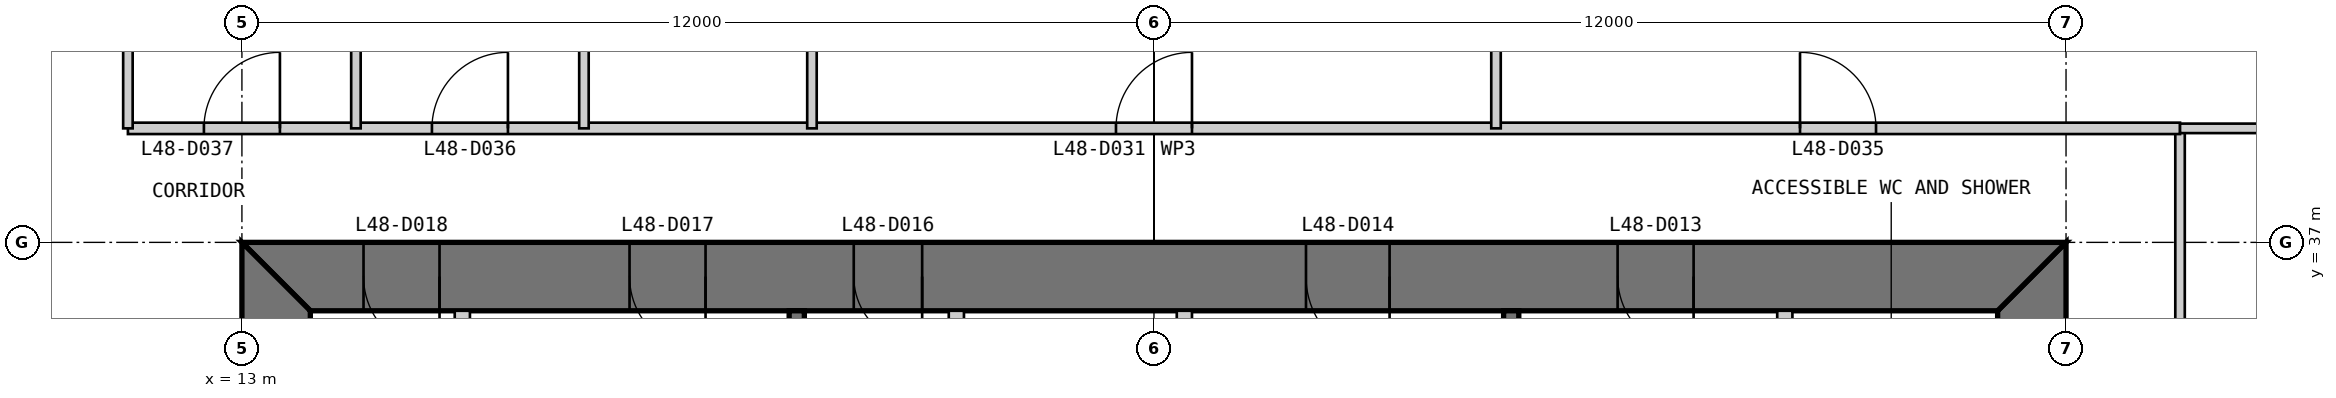
"""IFC4 building model, lengths in metres.
Left out: names, types, materials, properties, quantities, classifications, styles, units other than length and angle.
Written with IfcOpenShell. Run it as: python <this file> out.ifc"""

import sys

from ifc_helpers import new_model, si_unit, direction, frame, frame_2d, origin, place, context, subcontext, project, spatial, polyline, rectangle, outline, extrude, element, fill, save


model = new_model("IFC4")
c1 = context("Model", 3, precision=1e-05, world=origin(), true_north=direction((0.0, 1.0)))
c2 = subcontext(c1, "Body", "Model", "MODEL_VIEW")
j1 = project(units=[si_unit("LENGTHUNIT", "METRE"), si_unit("PLANEANGLEUNIT", "RADIAN")], contexts=[c1])
p1 = place(None, origin())
s1 = spatial("IfcSite", under=j1, at=p1, CompositionType="ELEMENT")
p2 = place(p1, origin())
s2 = spatial("IfcBuilding", under=s1, at=p2, CompositionType="ELEMENT")
p3 = place(p2, frame((0.0, 0.0, 205.8)))
s3 = spatial("IfcBuildingStorey", under=s2, at=p3, CompositionType="ELEMENT", Elevation=205.8)
p4 = place(p3, frame((36.55, 13.9, 0.0), z_axis=(0.0, 0.0, 1.0), x_axis=(0.0, 1.0, 0.0)))
e1 = element("IfcWall", 1, at=p4, inside=s3, PredefinedType="SHEAR", context=c2, shape_type="SweptSolid", body=[
    extrude(outline(polyline([(-0.9, -0.45), (23.1, -0.45), (22.2, 0.45), (0.0, 0.45), (-0.9, -0.45)])), origin(), (0.0, 0.0, 1.0), 4.0),
])
p5 = place(p4, frame((20.2, 0.0, 0.0)))
e2 = element("IfcOpeningElement", 2, at=p5, cuts=e1, PredefinedType="OPENING", context=c2, shape_type="SweptSolid", body=[
    extrude(rectangle(XDim=1.0, YDim=2.2, at=frame_2d((0.5, 1.1))), frame((0.0, 0.46, 0.0), z_axis=(0.0, -1.0, 0.0), x_axis=(1.0, 0.0, 0.0)), (0.0, 0.0, 1.0), 0.92),
])
p6 = place(p4, frame((17.25, 0.0, 0.0)))
e3 = element("IfcOpeningElement", 3, at=p6, cuts=e1, PredefinedType="OPENING", context=c2, shape_type="SweptSolid", body=[
    extrude(rectangle(XDim=0.9, YDim=2.2, at=frame_2d((0.45, 1.1))), frame((0.0, 0.46, 0.0), z_axis=(0.0, -1.0, 0.0), x_axis=(1.0, 0.0, 0.0)), (0.0, 0.0, 1.0), 0.92),
])
p7 = place(p3, frame((37.0, 36.55, 0.0), z_axis=(0.0, 0.0, 1.0), x_axis=(-1.0, 0.0, 0.0)))
e4 = element("IfcWall", 4, at=p7, inside=s3, PredefinedType="SHEAR", context=c2, shape_type="SweptSolid", body=[
    extrude(outline(polyline([(0.0, -0.45), (24.0, -0.45), (23.1, 0.45), (0.9, 0.45), (0.0, -0.45)])), origin(), (0.0, 0.0, 1.0), 4.0),
])
p8 = place(p7, frame((4.9, 0.0, 0.0)))
e5 = element("IfcOpeningElement", 5, at=p8, cuts=e4, PredefinedType="OPENING", context=c2, shape_type="SweptSolid", body=[
    extrude(rectangle(XDim=1.0, YDim=2.2, at=frame_2d((0.5, 1.1))), frame((0.0, 0.46, 0.0), z_axis=(0.0, -1.0, 0.0), x_axis=(1.0, 0.0, 0.0)), (0.0, 0.0, 1.0), 0.92),
])
p9 = place(p7, frame((8.9, 0.0, 0.0)))
e6 = element("IfcOpeningElement", 6, at=p9, cuts=e4, PredefinedType="OPENING", context=c2, shape_type="SweptSolid", body=[
    extrude(rectangle(XDim=1.1, YDim=2.2, at=frame_2d((0.55, 1.1))), frame((0.0, 0.46, 0.0), z_axis=(0.0, -1.0, 0.0), x_axis=(1.0, 0.0, 0.0)), (0.0, 0.0, 1.0), 0.92),
])
p10 = place(p7, frame((15.05, 0.0, 0.0)))
e7 = element("IfcOpeningElement", 7, at=p10, cuts=e4, PredefinedType="OPENING", context=c2, shape_type="SweptSolid", body=[
    extrude(rectangle(XDim=0.9, YDim=2.2, at=frame_2d((0.45, 1.1))), frame((0.0, 0.46, 0.0), z_axis=(0.0, -1.0, 0.0), x_axis=(1.0, 0.0, 0.0)), (0.0, 0.0, 1.0), 0.92),
])
p11 = place(p7, frame((17.9, 0.0, 0.0)))
e8 = element("IfcOpeningElement", 8, at=p11, cuts=e4, PredefinedType="OPENING", context=c2, shape_type="SweptSolid", body=[
    extrude(rectangle(XDim=1.0, YDim=2.2, at=frame_2d((0.5, 1.1))), frame((0.0, 0.46, 0.0), z_axis=(0.0, -1.0, 0.0), x_axis=(1.0, 0.0, 0.0)), (0.0, 0.0, 1.0), 0.92),
])
p12 = place(p7, frame((21.4, 0.0, 0.0)))
e9 = element("IfcOpeningElement", 9, at=p12, cuts=e4, PredefinedType="OPENING", context=c2, shape_type="SweptSolid", body=[
    extrude(rectangle(XDim=1.0, YDim=2.2, at=frame_2d((0.5, 1.1))), frame((0.0, 0.46, 0.0), z_axis=(0.0, -1.0, 0.0), x_axis=(1.0, 0.0, 0.0)), (0.0, 0.0, 1.0), 0.92),
])
p13 = place(p3, frame((13.45, 36.1, 0.0), z_axis=(0.0, 0.0, 1.0), x_axis=(0.0, -1.0, 0.0)))
e10 = element("IfcWall", 10, at=p13, inside=s3, PredefinedType="SHEAR", context=c2, shape_type="SweptSolid", body=[
    extrude(outline(polyline([(-0.9, -0.45), (23.1, -0.45), (22.2, 0.45), (0.0, 0.45), (-0.9, -0.45)])), origin(), (0.0, 0.0, 1.0), 4.0),
])
p14 = place(p13, frame((20.2, 0.0, 0.0)))
e11 = element("IfcOpeningElement", 11, at=p14, cuts=e10, PredefinedType="OPENING", context=c2, shape_type="SweptSolid", body=[
    extrude(rectangle(XDim=1.0, YDim=2.2, at=frame_2d((0.5, 1.1))), frame((0.0, 0.46, 0.0), z_axis=(0.0, -1.0, 0.0), x_axis=(1.0, 0.0, 0.0)), (0.0, 0.0, 1.0), 0.92),
])
p15 = place(p13, frame((17.25, 0.0, 0.0)))
e12 = element("IfcOpeningElement", 12, at=p15, cuts=e10, PredefinedType="OPENING", context=c2, shape_type="SweptSolid", body=[
    extrude(rectangle(XDim=0.9, YDim=2.2, at=frame_2d((0.45, 1.1))), frame((0.0, 0.46, 0.0), z_axis=(0.0, -1.0, 0.0), x_axis=(1.0, 0.0, 0.0)), (0.0, 0.0, 1.0), 0.92),
])
p16 = place(p3, frame((33.3, 36.1, 0.0), z_axis=(0.0, 0.0, 1.0), x_axis=(0.0, -1.0, 0.0)))
e13 = element("IfcWall", 13, at=p16, inside=s3, PredefinedType="PARTITIONING", context=c2, shape_type="SweptSolid", body=[
    extrude(rectangle(XDim=16.1, YDim=0.2, at=frame_2d((8.05, 0.0))), origin(), (0.0, 0.0, 1.0), 3.8),
])
p17 = place(p16, frame((4.4, 0.0, 0.0)))
e14 = element("IfcOpeningElement", 14, at=p17, cuts=e13, PredefinedType="OPENING", context=c2, shape_type="SweptSolid", body=[
    extrude(rectangle(XDim=0.9, YDim=2.2, at=frame_2d((0.45, 1.1))), frame((0.0, 0.11, 0.0), z_axis=(0.0, -1.0, 0.0), x_axis=(1.0, 0.0, 0.0)), (0.0, 0.0, 1.0), 0.22),
])
p18 = place(p3, frame((29.7, 36.1, 0.0), z_axis=(0.0, 0.0, 1.0), x_axis=(0.0, -1.0, 0.0)))
e15 = element("IfcWall", 15, at=p18, inside=s3, PredefinedType="SOLIDWALL", context=c2, shape_type="SweptSolid", body=[
    extrude(rectangle(XDim=16.1, YDim=0.2, at=frame_2d((8.05, 0.0))), origin(), (0.0, 0.0, 1.0), 3.8),
])
p19 = place(p18, frame((7.217, 0.0, 0.0)))
e16 = element("IfcOpeningElement", 16, at=p19, cuts=e15, PredefinedType="OPENING", context=c2, shape_type="SweptSolid", body=[
    extrude(rectangle(XDim=1.1, YDim=2.2, at=frame_2d((0.55, 1.1))), frame((0.0, 0.11, 0.0), z_axis=(0.0, -1.0, 0.0), x_axis=(1.0, 0.0, 0.0)), (0.0, 0.0, 1.0), 0.22),
])
p20 = place(p18, frame((10.55, 0.0, 0.0)))
e17 = element("IfcOpeningElement", 17, at=p20, cuts=e15, PredefinedType="OPENING", context=c2, shape_type="SweptSolid", body=[
    extrude(rectangle(XDim=1.1, YDim=2.2, at=frame_2d((0.55, 1.1))), frame((0.0, 0.11, 0.0), z_axis=(0.0, -1.0, 0.0), x_axis=(1.0, 0.0, 0.0)), (0.0, 0.0, 1.0), 0.22),
])
p21 = place(p18, frame((13.883, 0.0, 0.0)))
e18 = element("IfcOpeningElement", 18, at=p21, cuts=e15, PredefinedType="OPENING", context=c2, shape_type="SweptSolid", body=[
    extrude(rectangle(XDim=1.1, YDim=2.2, at=frame_2d((0.55, 1.1))), frame((0.0, 0.11, 0.0), z_axis=(0.0, -1.0, 0.0), x_axis=(1.0, 0.0, 0.0)), (0.0, 0.0, 1.0), 0.22),
])
p22 = place(p3, frame((25.4, 36.1, 0.0), z_axis=(0.0, 0.0, 1.0), x_axis=(0.0, -1.0, 0.0)))
e19 = element("IfcWall", 19, at=p22, inside=s3, PredefinedType="PARTITIONING", context=c2, shape_type="SweptSolid", body=[
    extrude(rectangle(XDim=3.3, YDim=0.2, at=frame_2d((1.65, 0.0))), origin(), (0.0, 0.0, 1.0), 3.8),
])
p23 = place(p22, frame((0.9, 0.0, 0.0)))
e20 = element("IfcOpeningElement", 20, at=p23, cuts=e19, PredefinedType="OPENING", context=c2, shape_type="SweptSolid", body=[
    extrude(rectangle(XDim=1.1, YDim=2.2, at=frame_2d((0.55, 1.1))), frame((0.0, 0.11, 0.0), z_axis=(0.0, -1.0, 0.0), x_axis=(1.0, 0.0, 0.0)), (0.0, 0.0, 1.0), 0.22),
])
p24 = place(p3, frame((22.4, 36.1, 0.0), z_axis=(0.0, 0.0, 1.0), x_axis=(0.0, -1.0, 0.0)))
e21 = element("IfcWall", 21, at=p24, inside=s3, PredefinedType="PARTITIONING", context=c2, shape_type="SweptSolid", body=[
    extrude(rectangle(XDim=3.3, YDim=0.2, at=frame_2d((1.65, 0.0))), origin(), (0.0, 0.0, 1.0), 3.8),
])
p25 = place(p3, frame((20.3, 36.1, 0.0), z_axis=(0.0, 0.0, 1.0), x_axis=(0.0, -1.0, 0.0)))
e22 = element("IfcWall", 22, at=p25, inside=s3, PredefinedType="SOLIDWALL", context=c2, shape_type="SweptSolid", body=[
    extrude(rectangle(XDim=6.1, YDim=0.2, at=frame_2d((3.05, 0.0))), origin(), (0.0, 0.0, 1.0), 3.8),
])
p26 = place(p3, frame((15.9, 36.1, 0.0), z_axis=(0.0, 0.0, 1.0), x_axis=(0.0, -1.0, 0.0)))
e23 = element("IfcWall", 23, at=p26, inside=s3, PredefinedType="PARTITIONING", context=c2, shape_type="SweptSolid", body=[
    extrude(rectangle(XDim=6.1, YDim=0.2, at=frame_2d((3.05, 0.0))), origin(), (0.0, 0.0, 1.0), 3.8),
])
p27 = place(p3, frame((38.5, 35.5, 0.0), z_axis=(0.0, 0.0, 1.0), x_axis=(0.0, 1.0, 0.0)))
e24 = element("IfcWall", 24, at=p27, inside=s3, PredefinedType="PARTITIONING", context=c2, shape_type="SweptSolid", body=[
    extrude(rectangle(XDim=3.0, YDim=0.125, at=frame_2d((1.5, 0.0))), origin(), (0.0, 0.0, 1.0), 3.85),
])
p28 = place(p3, frame((38.5, 38.5, 0.0), z_axis=(0.0, 0.0, 1.0), x_axis=(-1.0, 0.0, 0.0)))
e25 = element("IfcWall", 25, at=p28, inside=s3, PredefinedType="PARTITIONING", context=c2, shape_type="SweptSolid", body=[
    extrude(rectangle(XDim=27.0, YDim=0.15, at=frame_2d((13.5, 0.0))), origin(), (0.0, 0.0, 1.0), 3.85),
])
p29 = place(p28, frame((13.0, 0.0, 0.0)))
e26 = element("IfcOpeningElement", 26, at=p29, cuts=e25, PredefinedType="OPENING", context=c2, shape_type="SweptSolid", body=[
    extrude(rectangle(XDim=1.0, YDim=2.2, at=frame_2d((0.5, 1.1))), frame((0.0, 0.085, 0.0), z_axis=(0.0, -1.0, 0.0), x_axis=(1.0, 0.0, 0.0)), (0.0, 0.0, 1.0), 0.17),
])
p30 = place(p28, frame((4.0, 0.0, 0.0)))
e27 = element("IfcOpeningElement", 27, at=p30, cuts=e25, PredefinedType="OPENING", context=c2, shape_type="SweptSolid", body=[
    extrude(rectangle(XDim=1.0, YDim=2.2, at=frame_2d((0.5, 1.1))), frame((0.0, 0.085, 0.0), z_axis=(0.0, -1.0, 0.0), x_axis=(1.0, 0.0, 0.0)), (0.0, 0.0, 1.0), 0.17),
])
p31 = place(p28, frame((22.0, 0.0, 0.0)))
e28 = element("IfcOpeningElement", 28, at=p31, cuts=e25, PredefinedType="OPENING", context=c2, shape_type="SweptSolid", body=[
    extrude(rectangle(XDim=1.0, YDim=2.2, at=frame_2d((0.5, 1.1))), frame((0.0, 0.085, 0.0), z_axis=(0.0, -1.0, 0.0), x_axis=(1.0, 0.0, 0.0)), (0.0, 0.0, 1.0), 0.17),
])
p32 = place(p28, frame((25.0, 0.0, 0.0)))
e29 = element("IfcOpeningElement", 29, at=p32, cuts=e25, PredefinedType="OPENING", context=c2, shape_type="SweptSolid", body=[
    extrude(rectangle(XDim=1.0, YDim=2.2, at=frame_2d((0.5, 1.1))), frame((0.0, 0.085, 0.0), z_axis=(0.0, -1.0, 0.0), x_axis=(1.0, 0.0, 0.0)), (0.0, 0.0, 1.0), 0.17),
])
for number, where, z_axis, x_axis in (
    (30, (49.85, 38.5, 0.0), (0.0, 0.0, 1.0), (-1.0, 0.0, 0.0)),
    (31, (29.5, 49.85, 0.0), (0.0, 0.0, 1.0), (0.0, -1.0, 0.0)),
):
    element("IfcWall", number, at=place(p3, frame(where, z_axis=z_axis, x_axis=x_axis)), inside=s3, PredefinedType="PARTITIONING", context=c2, shape_type="SweptSolid", body=[
        extrude(rectangle(XDim=11.35, YDim=0.125, at=frame_2d((5.675, 0.0))), origin(), (0.0, 0.0, 1.0), 3.85),
    ])
p33 = place(p3, frame((20.5, 46.0, 0.0), z_axis=(0.0, 0.0, 1.0), x_axis=(0.0, -1.0, 0.0)))
e32 = element("IfcWall", 32, at=p33, inside=s3, PredefinedType="PARTITIONING", context=c2, shape_type="SweptSolid", body=[
    extrude(rectangle(XDim=7.5, YDim=0.125, at=frame_2d((3.75, 0.0))), origin(), (0.0, 0.0, 1.0), 3.85),
])
p34 = place(p33, frame((3.3, 0.0, 0.0)))
e33 = element("IfcOpeningElement", 33, at=p34, cuts=e32, PredefinedType="OPENING", context=c2, shape_type="SweptSolid", body=[
    extrude(rectangle(XDim=0.9, YDim=2.2, at=frame_2d((0.45, 1.1))), frame((0.0, 0.073, 0.0), z_axis=(0.0, -1.0, 0.0), x_axis=(1.0, 0.0, 0.0)), (0.0, 0.0, 1.0), 0.145),
])
p35 = place(p3, frame((17.5, 49.85, 0.0), z_axis=(0.0, 0.0, 1.0), x_axis=(0.0, -1.0, 0.0)))
e34 = element("IfcWall", 34, at=p35, inside=s3, PredefinedType="PARTITIONING", context=c2, shape_type="SweptSolid", body=[
    extrude(rectangle(XDim=11.35, YDim=0.125, at=frame_2d((5.675, 0.0))), origin(), (0.0, 0.0, 1.0), 3.85),
])
p36 = place(p3, frame((14.5, 46.0, 0.0), z_axis=(0.0, 0.0, 1.0), x_axis=(0.0, -1.0, 0.0)))
e35 = element("IfcWall", 35, at=p36, inside=s3, PredefinedType="PARTITIONING", context=c2, shape_type="SweptSolid", body=[
    extrude(rectangle(XDim=7.5, YDim=0.125, at=frame_2d((3.75, 0.0))), origin(), (0.0, 0.0, 1.0), 3.85),
])
p37 = place(p3, frame((11.5, 49.85, 0.0), z_axis=(0.0, 0.0, 1.0), x_axis=(0.0, -1.0, 0.0)))
e36 = element("IfcWall", 36, at=p37, inside=s3, PredefinedType="PARTITIONING", context=c2, shape_type="SweptSolid", body=[
    extrude(rectangle(XDim=11.35, YDim=0.125, at=frame_2d((5.675, 0.0))), origin(), (0.0, 0.0, 1.0), 3.85),
])
p38 = place(p8, origin())
e37 = element("IfcDoor", 37, at=p38, inside=s3, OperationType="SINGLE_SWING_LEFT", PredefinedType="DOOR", context=c2, shape_type="SweptSolid", body=[
    extrude(rectangle(XDim=1.0, YDim=2.2, at=frame_2d((0.5, 1.1))), frame((0.0, 0.025, 0.0), z_axis=(0.0, -1.0, 0.0), x_axis=(1.0, 0.0, 0.0)), (0.0, 0.0, 1.0), 0.05),
    extrude(outline(polyline([(0.0, 0.0), (0.04, 0.0), (0.04, 2.16), (0.96, 2.16), (0.96, 0.0), (1.0, 0.0), (1.0, 2.2), (0.0, 2.2), (0.0, 0.0)])), frame((0.0, 0.3, 0.0), z_axis=(0.0, -1.0, 0.0), x_axis=(1.0, 0.0, 0.0)), (0.0, 0.0, 1.0), 0.6),
])
fill(e5, e37)
p39 = place(p9, origin())
e38 = element("IfcDoor", 38, at=p39, inside=s3, OperationType="SINGLE_SWING_LEFT", PredefinedType="DOOR", context=c2, shape_type="SweptSolid", body=[
    extrude(rectangle(XDim=1.1, YDim=2.2, at=frame_2d((0.55, 1.1))), frame((0.0, 0.025, 0.0), z_axis=(0.0, -1.0, 0.0), x_axis=(1.0, 0.0, 0.0)), (0.0, 0.0, 1.0), 0.05),
    extrude(outline(polyline([(0.0, 0.0), (0.04, 0.0), (0.04, 2.16), (1.06, 2.16), (1.06, 0.0), (1.1, 0.0), (1.1, 2.2), (0.0, 2.2), (0.0, 0.0)])), frame((0.0, 0.3, 0.0), z_axis=(0.0, -1.0, 0.0), x_axis=(1.0, 0.0, 0.0)), (0.0, 0.0, 1.0), 0.6),
])
fill(e6, e38)
p40 = place(p10, origin())
e39 = element("IfcDoor", 39, at=p40, inside=s3, OperationType="SINGLE_SWING_LEFT", PredefinedType="DOOR", context=c2, shape_type="SweptSolid", body=[
    extrude(rectangle(XDim=0.9, YDim=2.2, at=frame_2d((0.45, 1.1))), frame((0.0, 0.025, 0.0), z_axis=(0.0, -1.0, 0.0), x_axis=(1.0, 0.0, 0.0)), (0.0, 0.0, 1.0), 0.05),
    extrude(outline(polyline([(0.0, 0.0), (0.04, 0.0), (0.04, 2.16), (0.86, 2.16), (0.86, 0.0), (0.9, 0.0), (0.9, 2.2), (0.0, 2.2), (0.0, 0.0)])), frame((0.0, 0.3, 0.0), z_axis=(0.0, -1.0, 0.0), x_axis=(1.0, 0.0, 0.0)), (0.0, 0.0, 1.0), 0.6),
])
fill(e7, e39)
p41 = place(p11, origin())
e40 = element("IfcDoor", 40, at=p41, inside=s3, OperationType="SINGLE_SWING_LEFT", PredefinedType="DOOR", context=c2, shape_type="SweptSolid", body=[
    extrude(rectangle(XDim=1.0, YDim=2.2, at=frame_2d((0.5, 1.1))), frame((0.0, 0.025, 0.0), z_axis=(0.0, -1.0, 0.0), x_axis=(1.0, 0.0, 0.0)), (0.0, 0.0, 1.0), 0.05),
    extrude(outline(polyline([(0.0, 0.0), (0.04, 0.0), (0.04, 2.16), (0.96, 2.16), (0.96, 0.0), (1.0, 0.0), (1.0, 2.2), (0.0, 2.2), (0.0, 0.0)])), frame((0.0, 0.3, 0.0), z_axis=(0.0, -1.0, 0.0), x_axis=(1.0, 0.0, 0.0)), (0.0, 0.0, 1.0), 0.6),
])
fill(e8, e40)
p42 = place(p12, origin())
e41 = element("IfcDoor", 41, at=p42, inside=s3, OperationType="SINGLE_SWING_LEFT", PredefinedType="DOOR", context=c2, shape_type="SweptSolid", body=[
    extrude(rectangle(XDim=1.0, YDim=2.2, at=frame_2d((0.5, 1.1))), frame((0.0, 0.025, 0.0), z_axis=(0.0, -1.0, 0.0), x_axis=(1.0, 0.0, 0.0)), (0.0, 0.0, 1.0), 0.05),
    extrude(outline(polyline([(0.0, 0.0), (0.04, 0.0), (0.04, 2.16), (0.96, 2.16), (0.96, 0.0), (1.0, 0.0), (1.0, 2.2), (0.0, 2.2), (0.0, 0.0)])), frame((0.0, 0.3, 0.0), z_axis=(0.0, -1.0, 0.0), x_axis=(1.0, 0.0, 0.0)), (0.0, 0.0, 1.0), 0.6),
])
fill(e9, e41)
p43 = place(p29, frame((1.0, 0.0, 0.0), z_axis=(0.0, 0.0, 1.0), x_axis=(-1.0, 0.0, 0.0)))
e42 = element("IfcDoor", 42, at=p43, inside=s3, OperationType="SINGLE_SWING_RIGHT", PredefinedType="DOOR", context=c2, shape_type="SweptSolid", body=[
    extrude(rectangle(XDim=1.0, YDim=2.2, at=frame_2d((0.5, 1.1))), frame((0.0, 0.025, 0.0), z_axis=(0.0, -1.0, 0.0), x_axis=(1.0, 0.0, 0.0)), (0.0, 0.0, 1.0), 0.05),
])
fill(e26, e42)
p44 = place(p30, frame((1.0, 0.0, 0.0), z_axis=(0.0, 0.0, 1.0), x_axis=(-1.0, 0.0, 0.0)))
e43 = element("IfcDoor", 43, at=p44, inside=s3, OperationType="SINGLE_SWING_LEFT", PredefinedType="DOOR", context=c2, shape_type="SweptSolid", body=[
    extrude(rectangle(XDim=1.0, YDim=2.2, at=frame_2d((0.5, 1.1))), frame((0.0, 0.025, 0.0), z_axis=(0.0, -1.0, 0.0), x_axis=(1.0, 0.0, 0.0)), (0.0, 0.0, 1.0), 0.05),
])
fill(e27, e43)
p45 = place(p31, frame((1.0, 0.0, 0.0), z_axis=(0.0, 0.0, 1.0), x_axis=(-1.0, 0.0, 0.0)))
e44 = element("IfcDoor", 44, at=p45, inside=s3, OperationType="SINGLE_SWING_RIGHT", PredefinedType="DOOR", context=c2, shape_type="SweptSolid", body=[
    extrude(rectangle(XDim=1.0, YDim=2.2, at=frame_2d((0.5, 1.1))), frame((0.0, 0.025, 0.0), z_axis=(0.0, -1.0, 0.0), x_axis=(1.0, 0.0, 0.0)), (0.0, 0.0, 1.0), 0.05),
])
fill(e28, e44)
p46 = place(p32, frame((1.0, 0.0, 0.0), z_axis=(0.0, 0.0, 1.0), x_axis=(-1.0, 0.0, 0.0)))
e45 = element("IfcDoor", 45, at=p46, inside=s3, OperationType="SINGLE_SWING_RIGHT", PredefinedType="DOOR", context=c2, shape_type="SweptSolid", body=[
    extrude(rectangle(XDim=1.0, YDim=2.2, at=frame_2d((0.5, 1.1))), frame((0.0, 0.025, 0.0), z_axis=(0.0, -1.0, 0.0), x_axis=(1.0, 0.0, 0.0)), (0.0, 0.0, 1.0), 0.05),
])
fill(e29, e45)
save(model, sys.argv[1])
